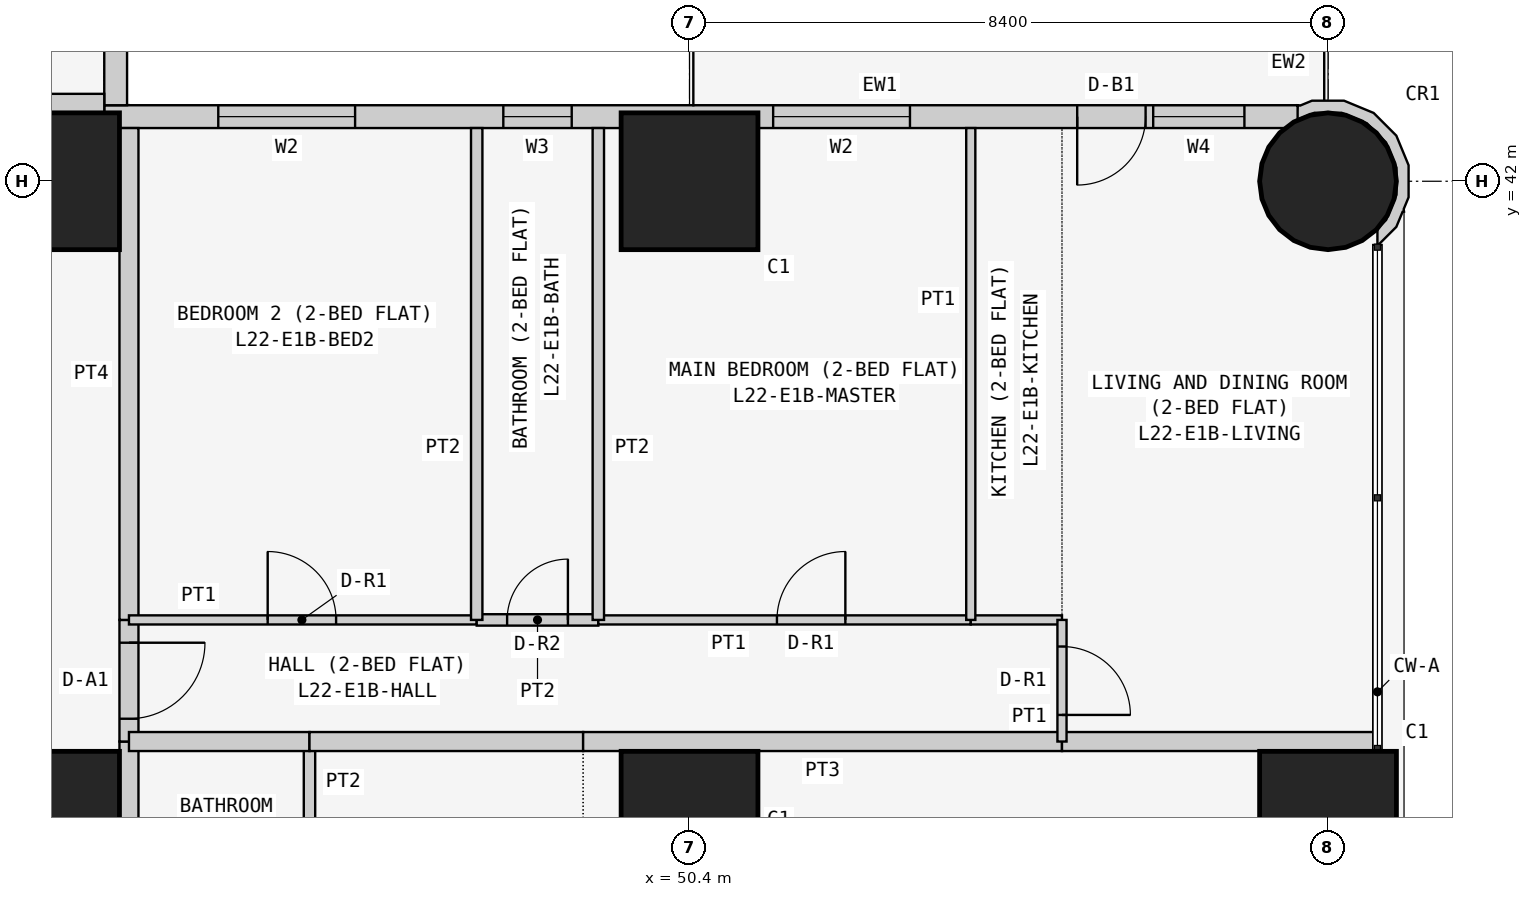
"""IFC4 building model, lengths in metres.
Left out: names, types, materials, properties, quantities, classifications, styles, units other than length and angle.
Written with IfcOpenShell. Run it as: python <this file> out.ifc"""

import sys

from ifc_helpers import new_model, si_unit, direction, frame, frame_2d, origin, origin_2d, place, context, subcontext, project, spatial, polyline, rectangle, circle, outline, extrude, element, fill, save


model = new_model("IFC4")
c1 = context("Model", 3, precision=1e-05, world=origin(), true_north=direction((0.0, 1.0)))
c2 = subcontext(c1, "Body", "Model", "MODEL_VIEW")
j1 = project(units=[si_unit("LENGTHUNIT", "METRE"), si_unit("PLANEANGLEUNIT", "RADIAN")], contexts=[c1])
p1 = place(None, origin())
s1 = spatial("IfcSite", under=j1, at=p1, CompositionType="ELEMENT")
p2 = place(p1, origin())
s2 = spatial("IfcBuilding", under=s1, at=p2, CompositionType="ELEMENT")
p3 = place(p2, frame((0.0, 0.0, 88.5)))
s3 = spatial("IfcBuildingStorey", under=s2, at=p3, CompositionType="ELEMENT", Elevation=88.5)
for number, where, z_axis, x_axis in (
    (1, (42.0, 33.6, 0.0), (0.0, 0.0, 1.0), (1.0, 0.0, 0.0)),
    (2, (42.0, 42.0, 0.0), (0.0, 0.0, 1.0), (1.0, 0.0, 0.0)),
    (3, (50.4, 33.6, 0.0), (0.0, 0.0, 1.0), (1.0, 0.0, 0.0)),
    (4, (50.4, 42.0, 0.0), (0.0, 0.0, 1.0), (1.0, 0.0, 0.0)),
    (5, (58.8, 33.6, 0.0), (0.0, 0.0, 1.0), (1.0, 0.0, 0.0)),
):
    element("IfcColumn", number, at=place(p3, frame(where, z_axis=z_axis, x_axis=x_axis)), inside=s3, PredefinedType="COLUMN", context=c2, shape_type="SweptSolid", body=[
        extrude(rectangle(XDim=1.8, YDim=1.8, at=origin_2d()), origin(), (0.0, 0.0, 1.0), 3.6),
    ])
p4 = place(p3, frame((58.8, 42.0, 0.0), z_axis=(0.0, 0.0, 1.0), x_axis=(1.0, 0.0, 0.0)))
e6 = element("IfcColumn", 6, at=p4, inside=s3, PredefinedType="COLUMN", context=c2, shape_type="SweptSolid", body=[
    extrude(circle(Radius=0.9, at=origin_2d()), origin(), (0.0, 0.0, 1.0), 3.6),
])
p5 = place(p3, frame((58.4, 42.85, 0.0), z_axis=(0.0, 0.0, 1.0), x_axis=(-1.0, 0.0, 0.0)))
e7 = element("IfcWall", 7, at=p5, inside=s3, PredefinedType="SOLIDWALL", context=c2, shape_type="SweptSolid", body=[
    extrude(rectangle(XDim=15.7, YDim=0.3, at=frame_2d((7.85, 0.0))), origin(), (0.0, 0.0, 1.0), 3.45),
])
p6 = place(p5, frame((12.4, 0.0, 0.9)))
e8 = element("IfcOpeningElement", 8, at=p6, cuts=e7, PredefinedType="OPENING", context=c2, shape_type="SweptSolid", body=[
    extrude(rectangle(XDim=1.8, YDim=1.5, at=frame_2d((0.9, 0.75))), frame((0.0, 0.16, 0.0), z_axis=(0.0, -1.0, 0.0), x_axis=(1.0, 0.0, 0.0)), (0.0, 0.0, 1.0), 0.32),
])
p7 = place(p5, frame((9.55, 0.0, 1.5)))
e9 = element("IfcOpeningElement", 9, at=p7, cuts=e7, PredefinedType="OPENING", context=c2, shape_type="SweptSolid", body=[
    extrude(rectangle(XDim=0.9, YDim=0.7, at=frame_2d((0.45, 0.35))), frame((0.0, 0.16, 0.0), z_axis=(0.0, -1.0, 0.0), x_axis=(1.0, 0.0, 0.0)), (0.0, 0.0, 1.0), 0.32),
])
p8 = place(p5, frame((5.1, 0.0, 0.9)))
e10 = element("IfcOpeningElement", 10, at=p8, cuts=e7, PredefinedType="OPENING", context=c2, shape_type="SweptSolid", body=[
    extrude(rectangle(XDim=1.8, YDim=1.5, at=frame_2d((0.9, 0.75))), frame((0.0, 0.16, 0.0), z_axis=(0.0, -1.0, 0.0), x_axis=(1.0, 0.0, 0.0)), (0.0, 0.0, 1.0), 0.32),
])
p9 = place(p5, frame((2.0, 0.0, 0.0)))
e11 = element("IfcOpeningElement", 11, at=p9, cuts=e7, PredefinedType="OPENING", context=c2, shape_type="SweptSolid", body=[
    extrude(rectangle(XDim=0.9, YDim=2.4, at=frame_2d((0.45, 1.2))), frame((0.0, 0.16, 0.0), z_axis=(0.0, -1.0, 0.0), x_axis=(1.0, 0.0, 0.0)), (0.0, 0.0, 1.0), 0.32),
])
p10 = place(p5, frame((0.7, 0.0, 0.9)))
e12 = element("IfcOpeningElement", 12, at=p10, cuts=e7, PredefinedType="OPENING", context=c2, shape_type="SweptSolid", body=[
    extrude(rectangle(XDim=1.2, YDim=1.5, at=frame_2d((0.6, 0.75))), frame((0.0, 0.16, 0.0), z_axis=(0.0, -1.0, 0.0), x_axis=(1.0, 0.0, 0.0)), (0.0, 0.0, 1.0), 0.32),
])
p11 = place(p3, frame((42.85, 43.0, 0.0), z_axis=(0.0, 0.0, 1.0), x_axis=(0.0, 1.0, 0.0)))
e13 = element("IfcWall", 13, at=p11, inside=s3, PredefinedType="SOLIDWALL", context=c2, shape_type="SweptSolid", body=[
    extrude(rectangle(XDim=15.4, YDim=0.3, at=frame_2d((7.7, 0.0))), origin(), (0.0, 0.0, 1.0), 3.45),
])
p12 = place(p11, frame((1.2, 0.0, 0.9)))
e14 = element("IfcOpeningElement", 14, at=p12, cuts=e13, PredefinedType="OPENING", context=c2, shape_type="SweptSolid", body=[
    extrude(rectangle(XDim=1.8, YDim=1.5, at=frame_2d((0.9, 0.75))), frame((0.0, 0.16, 0.0), z_axis=(0.0, -1.0, 0.0), x_axis=(1.0, 0.0, 0.0)), (0.0, 0.0, 1.0), 0.32),
])
p13 = place(p11, frame((4.95, 0.0, 1.5)))
e15 = element("IfcOpeningElement", 15, at=p13, cuts=e13, PredefinedType="OPENING", context=c2, shape_type="SweptSolid", body=[
    extrude(rectangle(XDim=0.9, YDim=0.7, at=frame_2d((0.45, 0.35))), frame((0.0, 0.16, 0.0), z_axis=(0.0, -1.0, 0.0), x_axis=(1.0, 0.0, 0.0)), (0.0, 0.0, 1.0), 0.32),
])
p14 = place(p11, frame((8.5, 0.0, 0.9)))
e16 = element("IfcOpeningElement", 16, at=p14, cuts=e13, PredefinedType="OPENING", context=c2, shape_type="SweptSolid", body=[
    extrude(rectangle(XDim=1.8, YDim=1.5, at=frame_2d((0.9, 0.75))), frame((0.0, 0.16, 0.0), z_axis=(0.0, -1.0, 0.0), x_axis=(1.0, 0.0, 0.0)), (0.0, 0.0, 1.0), 0.32),
])
p15 = place(p11, frame((12.5, 0.0, 0.0)))
e17 = element("IfcOpeningElement", 17, at=p15, cuts=e13, PredefinedType="OPENING", context=c2, shape_type="SweptSolid", body=[
    extrude(rectangle(XDim=0.9, YDim=2.4, at=frame_2d((0.45, 1.2))), frame((0.0, 0.16, 0.0), z_axis=(0.0, -1.0, 0.0), x_axis=(1.0, 0.0, 0.0)), (0.0, 0.0, 1.0), 0.32),
])
p16 = place(p11, frame((13.5, 0.0, 0.9)))
e18 = element("IfcOpeningElement", 18, at=p16, cuts=e13, PredefinedType="OPENING", context=c2, shape_type="SweptSolid", body=[
    extrude(rectangle(XDim=1.2, YDim=1.5, at=frame_2d((0.6, 0.75))), frame((0.0, 0.16, 0.0), z_axis=(0.0, -1.0, 0.0), x_axis=(1.0, 0.0, 0.0)), (0.0, 0.0, 1.0), 0.32),
])
p17 = place(p3, frame((59.411, 41.233, 0.0), z_axis=(0.0, 0.0, 1.0), x_axis=(0.926129809145, 0.377204953059, 0.0)))
e19 = element("IfcWall", 19, at=p17, inside=s3, PredefinedType="SOLIDWALL", context=c2, shape_type="SweptSolid", body=[
    extrude(outline(polyline([(0.626, 0.345), (0.785, 0.736), (0.782, 1.157), (0.619, 1.546), (0.319, 1.843), (-0.072, 2.002), (-0.24, 2.001), (-0.27, 2.017), (-0.37, 1.841), (-0.102, 1.842), (0.23, 1.707), (0.485, 1.455), (0.624, 1.125), (0.626, 0.766), (0.491, 0.434), (0.238, 0.179), (0.09, 0.117), (0.011, -0.078), (0.024, -0.083), (0.329, 0.045), (0.48, 0.198), (0.499, 0.193), (0.508, 0.225), (0.626, 0.345)])), origin(), (0.0, 0.0, 1.0), 3.45),
])
p18 = place(p3, frame((36.229, 43.025, 0.0), z_axis=(0.0, 0.0, 1.0), x_axis=(1.0, 0.0, 0.0)))
e20 = element("IfcWall", 20, at=p18, inside=s3, PredefinedType="PARTITIONING", context=c2, shape_type="SweptSolid", body=[
    extrude(rectangle(XDim=6.471, YDim=0.25, at=frame_2d((3.235, 0.0))), origin(), (0.0, 0.0, 1.0), 3.45),
])
p19 = place(p3, frame((43.025, 34.629, 0.0), z_axis=(0.0, 0.0, 1.0), x_axis=(0.0, -1.0, 0.0)))
e21 = element("IfcWall", 21, at=p19, inside=s3, PredefinedType="PARTITIONING", context=c2, shape_type="SweptSolid", body=[
    extrude(rectangle(XDim=2.629, YDim=0.25, at=frame_2d((1.314, 0.0))), origin(), (0.0, 0.0, 1.0), 3.45),
])
p20 = place(p3, frame((43.025, 36.229, 0.0), z_axis=(0.0, 0.0, 1.0), x_axis=(0.0, -1.0, 0.0)))
e22 = element("IfcWall", 22, at=p20, inside=s3, PredefinedType="PARTITIONING", context=c2, shape_type="SweptSolid", body=[
    extrude(rectangle(XDim=1.6, YDim=0.25, at=frame_2d((0.8, 0.0))), origin(), (0.0, 0.0, 1.0), 3.45),
])
p21 = place(p20, frame((0.3, 0.0, 0.0)))
e23 = element("IfcOpeningElement", 23, at=p21, cuts=e22, PredefinedType="OPENING", context=c2, shape_type="SweptSolid", body=[
    extrude(rectangle(XDim=1.0, YDim=2.1, at=frame_2d((0.5, 1.05))), frame((0.0, 0.135, 0.0), z_axis=(0.0, -1.0, 0.0), x_axis=(1.0, 0.0, 0.0)), (0.0, 0.0, 1.0), 0.27),
])
p22 = place(p3, frame((43.025, 42.7, 0.0), z_axis=(0.0, 0.0, 1.0), x_axis=(0.0, -1.0, 0.0)))
e24 = element("IfcWall", 24, at=p22, inside=s3, PredefinedType="PARTITIONING", context=c2, shape_type="SweptSolid", body=[
    extrude(rectangle(XDim=6.471, YDim=0.25, at=frame_2d((3.235, 0.0))), origin(), (0.0, 0.0, 1.0), 3.45),
])
p23 = place(p3, frame((45.4, 32.0, 0.0), z_axis=(0.0, 0.0, 1.0), x_axis=(0.0, 1.0, 0.0)))
e25 = element("IfcWall", 25, at=p23, inside=s3, PredefinedType="PARTITIONING", context=c2, shape_type="SweptSolid", body=[
    extrude(rectangle(XDim=2.629, YDim=0.15, at=frame_2d((1.314, 0.0))), origin(), (0.0, 0.0, 1.0), 3.45),
])
p24 = place(p3, frame((45.4, 34.629, 0.0), z_axis=(0.0, 0.0, 1.0), x_axis=(-1.0, 0.0, 0.0)))
e26 = element("IfcWall", 26, at=p24, inside=s3, PredefinedType="PARTITIONING", context=c2, shape_type="SweptSolid", body=[
    extrude(rectangle(XDim=2.375, YDim=0.25, at=frame_2d((1.188, 0.0))), origin(), (0.0, 0.0, 1.0), 3.45),
])
p25 = place(p3, frame((49.0, 34.629, 0.0), z_axis=(0.0, 0.0, 1.0), x_axis=(-1.0, 0.0, 0.0)))
e27 = element("IfcWall", 27, at=p25, inside=s3, PredefinedType="PARTITIONING", context=c2, shape_type="SweptSolid", body=[
    extrude(rectangle(XDim=3.6, YDim=0.25, at=frame_2d((1.8, 0.0))), origin(), (0.0, 0.0, 1.0), 3.45),
])
p26 = place(p3, frame((55.3, 34.629, 0.0), z_axis=(0.0, 0.0, 1.0), x_axis=(-1.0, 0.0, 0.0)))
e28 = element("IfcWall", 28, at=p26, inside=s3, PredefinedType="PARTITIONING", context=c2, shape_type="SweptSolid", body=[
    extrude(rectangle(XDim=6.3, YDim=0.25, at=frame_2d((3.15, 0.0))), origin(), (0.0, 0.0, 1.0), 3.45),
])
p27 = place(p3, frame((59.45, 34.629, 0.0), z_axis=(0.0, 0.0, 1.0), x_axis=(-1.0, 0.0, 0.0)))
e29 = element("IfcWall", 29, at=p27, inside=s3, PredefinedType="PARTITIONING", context=c2, shape_type="SweptSolid", body=[
    extrude(rectangle(XDim=4.15, YDim=0.25, at=frame_2d((2.075, 0.0))), origin(), (0.0, 0.0, 1.0), 3.45),
])
p28 = place(p3, frame((47.6, 36.229, 0.0), z_axis=(0.0, 0.0, 1.0), x_axis=(-1.0, 0.0, 0.0)))
e30 = element("IfcWall", 30, at=p28, inside=s3, PredefinedType="PARTITIONING", context=c2, shape_type="SweptSolid", body=[
    extrude(rectangle(XDim=4.575, YDim=0.12, at=frame_2d((2.288, 0.0))), origin(), (0.0, 0.0, 1.0), 3.45),
])
p29 = place(p28, frame((1.85, 0.0, 0.0)))
e31 = element("IfcOpeningElement", 31, at=p29, cuts=e30, PredefinedType="OPENING", context=c2, shape_type="SweptSolid", body=[
    extrude(rectangle(XDim=0.9, YDim=2.1, at=frame_2d((0.45, 1.05))), frame((0.0, 0.07, 0.0), z_axis=(0.0, -1.0, 0.0), x_axis=(1.0, 0.0, 0.0)), (0.0, 0.0, 1.0), 0.14),
])
p30 = place(p3, frame((49.2, 36.229, 0.0), z_axis=(0.0, 0.0, 1.0), x_axis=(-1.0, 0.0, 0.0)))
e32 = element("IfcWall", 32, at=p30, inside=s3, PredefinedType="PARTITIONING", context=c2, shape_type="SweptSolid", body=[
    extrude(rectangle(XDim=1.6, YDim=0.15, at=frame_2d((0.8, 0.0))), origin(), (0.0, 0.0, 1.0), 3.45),
])
p31 = place(p30, frame((0.4, 0.0, 0.0)))
e33 = element("IfcOpeningElement", 33, at=p31, cuts=e32, PredefinedType="OPENING", context=c2, shape_type="SweptSolid", body=[
    extrude(rectangle(XDim=0.8, YDim=2.1, at=frame_2d((0.4, 1.05))), frame((0.0, 0.085, 0.0), z_axis=(0.0, -1.0, 0.0), x_axis=(1.0, 0.0, 0.0)), (0.0, 0.0, 1.0), 0.17),
])
p32 = place(p3, frame((54.1, 36.229, 0.0), z_axis=(0.0, 0.0, 1.0), x_axis=(-1.0, 0.0, 0.0)))
e34 = element("IfcWall", 34, at=p32, inside=s3, PredefinedType="PARTITIONING", context=c2, shape_type="SweptSolid", body=[
    extrude(rectangle(XDim=4.9, YDim=0.12, at=frame_2d((2.45, 0.0))), origin(), (0.0, 0.0, 1.0), 3.45),
])
p33 = place(p32, frame((1.65, 0.0, 0.0)))
e35 = element("IfcOpeningElement", 35, at=p33, cuts=e34, PredefinedType="OPENING", context=c2, shape_type="SweptSolid", body=[
    extrude(rectangle(XDim=0.9, YDim=2.1, at=frame_2d((0.45, 1.05))), frame((0.0, 0.07, 0.0), z_axis=(0.0, -1.0, 0.0), x_axis=(1.0, 0.0, 0.0)), (0.0, 0.0, 1.0), 0.14),
])
p34 = place(p3, frame((55.3, 36.229, 0.0), z_axis=(0.0, 0.0, 1.0), x_axis=(-1.0, 0.0, 0.0)))
e36 = element("IfcWall", 36, at=p34, inside=s3, PredefinedType="PARTITIONING", context=c2, shape_type="SweptSolid", body=[
    extrude(rectangle(XDim=1.2, YDim=0.12, at=frame_2d((0.6, 0.0))), origin(), (0.0, 0.0, 1.0), 3.45),
])
p35 = place(p3, frame((55.3, 34.629, 0.0), z_axis=(0.0, 0.0, 1.0), x_axis=(0.0, 1.0, 0.0)))
e37 = element("IfcWall", 37, at=p35, inside=s3, PredefinedType="PARTITIONING", context=c2, shape_type="SweptSolid", body=[
    extrude(rectangle(XDim=1.6, YDim=0.12, at=frame_2d((0.8, 0.0))), origin(), (0.0, 0.0, 1.0), 3.45),
])
p36 = place(p35, frame((0.35, 0.0, 0.0)))
e38 = element("IfcOpeningElement", 38, at=p36, cuts=e37, PredefinedType="OPENING", context=c2, shape_type="SweptSolid", body=[
    extrude(rectangle(XDim=0.9, YDim=2.1, at=frame_2d((0.45, 1.05))), frame((0.0, 0.07, 0.0), z_axis=(0.0, -1.0, 0.0), x_axis=(1.0, 0.0, 0.0)), (0.0, 0.0, 1.0), 0.14),
])
for number, where, z_axis, x_axis in (
    (39, (47.6, 36.229, 0.0), (0.0, 0.0, 1.0), (0.0, 1.0, 0.0)),
    (40, (49.2, 36.229, 0.0), (0.0, 0.0, 1.0), (0.0, 1.0, 0.0)),
):
    element("IfcWall", number, at=place(p3, frame(where, z_axis=z_axis, x_axis=x_axis)), inside=s3, PredefinedType="PARTITIONING", context=c2, shape_type="SweptSolid", body=[
        extrude(rectangle(XDim=6.471, YDim=0.15, at=frame_2d((3.235, 0.0))), origin(), (0.0, 0.0, 1.0), 3.45),
    ])
p37 = place(p3, frame((54.1, 36.229, 0.0), z_axis=(0.0, 0.0, 1.0), x_axis=(0.0, 1.0, 0.0)))
e41 = element("IfcWall", 41, at=p37, inside=s3, PredefinedType="PARTITIONING", context=c2, shape_type="SweptSolid", body=[
    extrude(rectangle(XDim=6.471, YDim=0.12, at=frame_2d((3.235, 0.0))), origin(), (0.0, 0.0, 1.0), 3.45),
])
p38 = place(p6, origin())
e42 = element("IfcWindow", 42, at=p38, inside=s3, PartitioningType="SINGLE_PANEL", PredefinedType="WINDOW", context=c2, shape_type="SweptSolid", body=[
    extrude(rectangle(XDim=1.8, YDim=1.5, at=frame_2d((0.9, 0.75))), frame((0.0, 0.03, 0.0), z_axis=(0.0, -1.0, 0.0), x_axis=(1.0, 0.0, 0.0)), (0.0, 0.0, 1.0), 0.06),
])
fill(e8, e42)
p39 = place(p7, origin())
e43 = element("IfcWindow", 43, at=p39, inside=s3, PartitioningType="SINGLE_PANEL", PredefinedType="WINDOW", context=c2, shape_type="SweptSolid", body=[
    extrude(rectangle(XDim=0.9, YDim=0.7, at=frame_2d((0.45, 0.35))), frame((0.0, 0.03, 0.0), z_axis=(0.0, -1.0, 0.0), x_axis=(1.0, 0.0, 0.0)), (0.0, 0.0, 1.0), 0.06),
])
fill(e9, e43)
p40 = place(p8, origin())
e44 = element("IfcWindow", 44, at=p40, inside=s3, PartitioningType="SINGLE_PANEL", PredefinedType="WINDOW", context=c2, shape_type="SweptSolid", body=[
    extrude(rectangle(XDim=1.8, YDim=1.5, at=frame_2d((0.9, 0.75))), frame((0.0, 0.03, 0.0), z_axis=(0.0, -1.0, 0.0), x_axis=(1.0, 0.0, 0.0)), (0.0, 0.0, 1.0), 0.06),
])
fill(e10, e44)
p41 = place(p9, origin())
e45 = element("IfcDoor", 45, at=p41, inside=s3, OperationType="SINGLE_SWING_RIGHT", PredefinedType="DOOR", context=c2, shape_type="SweptSolid", body=[
    extrude(rectangle(XDim=0.9, YDim=2.4, at=frame_2d((0.45, 1.2))), frame((0.0, 0.025, 0.0), z_axis=(0.0, -1.0, 0.0), x_axis=(1.0, 0.0, 0.0)), (0.0, 0.0, 1.0), 0.05),
])
fill(e11, e45)
p42 = place(p10, origin())
e46 = element("IfcWindow", 46, at=p42, inside=s3, PartitioningType="SINGLE_PANEL", PredefinedType="WINDOW", context=c2, shape_type="SweptSolid", body=[
    extrude(rectangle(XDim=1.2, YDim=1.5, at=frame_2d((0.6, 0.75))), frame((0.0, 0.03, 0.0), z_axis=(0.0, -1.0, 0.0), x_axis=(1.0, 0.0, 0.0)), (0.0, 0.0, 1.0), 0.06),
])
fill(e12, e46)
p43 = place(p21, origin())
e47 = element("IfcDoor", 47, at=p43, inside=s3, OperationType="SINGLE_SWING_LEFT", PredefinedType="DOOR", context=c2, shape_type="SweptSolid", body=[
    extrude(rectangle(XDim=1.0, YDim=2.1, at=frame_2d((0.5, 1.05))), frame((0.0, 0.025, 0.0), z_axis=(0.0, -1.0, 0.0), x_axis=(1.0, 0.0, 0.0)), (0.0, 0.0, 1.0), 0.05),
])
fill(e23, e47)
p44 = place(p29, frame((0.9, 0.0, 0.0), z_axis=(0.0, 0.0, 1.0), x_axis=(-1.0, 0.0, 0.0)))
e48 = element("IfcDoor", 48, at=p44, inside=s3, OperationType="SINGLE_SWING_LEFT", PredefinedType="DOOR", context=c2, shape_type="SweptSolid", body=[
    extrude(rectangle(XDim=0.9, YDim=2.1, at=frame_2d((0.45, 1.05))), frame((0.0, 0.025, 0.0), z_axis=(0.0, -1.0, 0.0), x_axis=(1.0, 0.0, 0.0)), (0.0, 0.0, 1.0), 0.05),
])
fill(e31, e48)
p45 = place(p31, frame((0.8, 0.0, 0.0), z_axis=(0.0, 0.0, 1.0), x_axis=(-1.0, 0.0, 0.0)))
e49 = element("IfcDoor", 49, at=p45, inside=s3, OperationType="SINGLE_SWING_RIGHT", PredefinedType="DOOR", context=c2, shape_type="SweptSolid", body=[
    extrude(rectangle(XDim=0.8, YDim=2.1, at=frame_2d((0.4, 1.05))), frame((0.0, 0.025, 0.0), z_axis=(0.0, -1.0, 0.0), x_axis=(1.0, 0.0, 0.0)), (0.0, 0.0, 1.0), 0.05),
])
fill(e33, e49)
p46 = place(p33, frame((0.9, 0.0, 0.0), z_axis=(0.0, 0.0, 1.0), x_axis=(-1.0, 0.0, 0.0)))
e50 = element("IfcDoor", 50, at=p46, inside=s3, OperationType="SINGLE_SWING_RIGHT", PredefinedType="DOOR", context=c2, shape_type="SweptSolid", body=[
    extrude(rectangle(XDim=0.9, YDim=2.1, at=frame_2d((0.45, 1.05))), frame((0.0, 0.025, 0.0), z_axis=(0.0, -1.0, 0.0), x_axis=(1.0, 0.0, 0.0)), (0.0, 0.0, 1.0), 0.05),
])
fill(e35, e50)
p47 = place(p36, frame((0.9, 0.0, 0.0), z_axis=(0.0, 0.0, 1.0), x_axis=(-1.0, 0.0, 0.0)))
e51 = element("IfcDoor", 51, at=p47, inside=s3, OperationType="SINGLE_SWING_RIGHT", PredefinedType="DOOR", context=c2, shape_type="SweptSolid", body=[
    extrude(rectangle(XDim=0.9, YDim=2.1, at=frame_2d((0.45, 1.05))), frame((0.0, 0.025, 0.0), z_axis=(0.0, -1.0, 0.0), x_axis=(1.0, 0.0, 0.0)), (0.0, 0.0, 1.0), 0.05),
])
fill(e38, e51)
save(model, sys.argv[1])
